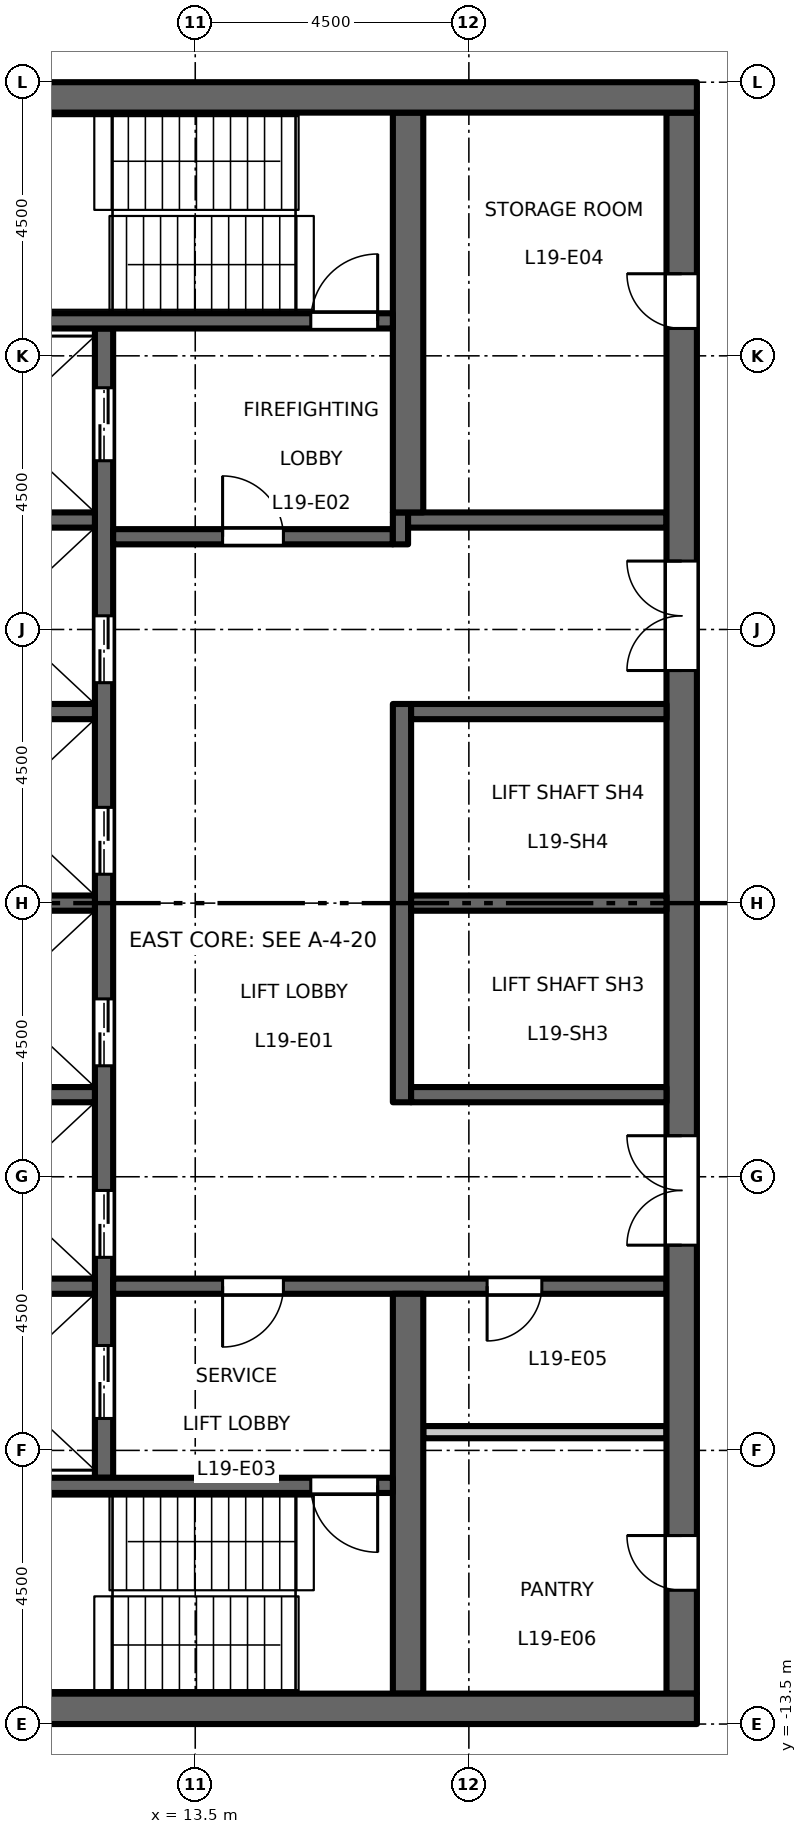
"""IFC4 building model, lengths in metres.
Left out: names, types, materials, properties, quantities, classifications, styles, units other than length and angle.
Written with IfcOpenShell. Run it as: python <this file> out.ifc"""

import sys

from ifc_helpers import new_model, si_unit, direction, frame, frame_2d, origin, place, context, subcontext, project, spatial, rectangle, extrude, element, fill, save


model = new_model("IFC4")
c1 = context("Model", 3, precision=1e-05, world=origin(), true_north=direction((0.0, 1.0)))
c2 = subcontext(c1, "Body", "Model", "MODEL_VIEW")
j1 = project(units=[si_unit("LENGTHUNIT", "METRE"), si_unit("PLANEANGLEUNIT", "RADIAN")], contexts=[c1])
p1 = place(None, origin())
s1 = spatial("IfcSite", under=j1, at=p1, CompositionType="ELEMENT")
p2 = place(p1, origin())
s2 = spatial("IfcBuilding", under=s1, at=p2, CompositionType="ELEMENT")
p3 = place(p2, frame((0.0, 0.0, 89.7)))
s3 = spatial("IfcBuildingStorey", under=s2, at=p3, CompositionType="ELEMENT", Elevation=89.7)
p4 = place(p3, frame((12.0, -9.45, 0.0), z_axis=(0.0, 0.0, 1.0), x_axis=(0.0, 1.0, 0.0)))
e1 = element("IfcWall", 1, at=p4, inside=s3, PredefinedType="SHEAR", context=c2, shape_type="SweptSolid", body=[
    extrude(rectangle(XDim=18.9, YDim=0.3, at=frame_2d((9.45, 0.0))), origin(), (0.0, 0.0, 1.0), 4.3),
])
p5 = place(p4, frame((3.625, 0.0, 0.0)))
e2 = element("IfcOpeningElement", 2, at=p5, cuts=e1, PredefinedType="OPENING", context=c2, shape_type="SweptSolid", body=[
    extrude(rectangle(XDim=1.1, YDim=2.1, at=frame_2d((0.55, 1.05))), frame((0.0, 0.16, 0.0), z_axis=(0.0, -1.0, 0.0), x_axis=(1.0, 0.0, 0.0)), (0.0, 0.0, 1.0), 0.32),
])
p6 = place(p4, frame((6.775, 0.0, 0.0)))
e3 = element("IfcOpeningElement", 3, at=p6, cuts=e1, PredefinedType="OPENING", context=c2, shape_type="SweptSolid", body=[
    extrude(rectangle(XDim=1.1, YDim=2.1, at=frame_2d((0.55, 1.05))), frame((0.0, 0.16, 0.0), z_axis=(0.0, -1.0, 0.0), x_axis=(1.0, 0.0, 0.0)), (0.0, 0.0, 1.0), 0.32),
])
p7 = place(p4, frame((9.925, 0.0, 0.0)))
e4 = element("IfcOpeningElement", 4, at=p7, cuts=e1, PredefinedType="OPENING", context=c2, shape_type="SweptSolid", body=[
    extrude(rectangle(XDim=1.1, YDim=2.1, at=frame_2d((0.55, 1.05))), frame((0.0, 0.16, 0.0), z_axis=(0.0, -1.0, 0.0), x_axis=(1.0, 0.0, 0.0)), (0.0, 0.0, 1.0), 0.32),
])
p8 = place(p4, frame((13.075, 0.0, 0.0)))
e5 = element("IfcOpeningElement", 5, at=p8, cuts=e1, PredefinedType="OPENING", context=c2, shape_type="SweptSolid", body=[
    extrude(rectangle(XDim=1.1, YDim=2.1, at=frame_2d((0.55, 1.05))), frame((0.0, 0.16, 0.0), z_axis=(0.0, -1.0, 0.0), x_axis=(1.0, 0.0, 0.0)), (0.0, 0.0, 1.0), 0.32),
])
p9 = place(p4, frame((16.725, 0.0, 0.0)))
e6 = element("IfcOpeningElement", 6, at=p9, cuts=e1, PredefinedType="OPENING", context=c2, shape_type="SweptSolid", body=[
    extrude(rectangle(XDim=1.2, YDim=2.1, at=frame_2d((0.6, 1.05))), frame((0.0, 0.16, 0.0), z_axis=(0.0, -1.0, 0.0), x_axis=(1.0, 0.0, 0.0)), (0.0, 0.0, 1.0), 0.32),
])
p10 = place(p4, frame((0.975, 0.0, 0.0)))
e7 = element("IfcOpeningElement", 7, at=p10, cuts=e1, PredefinedType="OPENING", context=c2, shape_type="SweptSolid", body=[
    extrude(rectangle(XDim=1.2, YDim=2.1, at=frame_2d((0.6, 1.05))), frame((0.0, 0.16, 0.0), z_axis=(0.0, -1.0, 0.0), x_axis=(1.0, 0.0, 0.0)), (0.0, 0.0, 1.0), 0.32),
])
p11 = place(p3, frame((12.15, 6.025, 0.0), z_axis=(0.0, 0.0, 1.0), x_axis=(1.0, 0.0, 0.0)))
e8 = element("IfcWall", 8, at=p11, inside=s3, PredefinedType="SHEAR", context=c2, shape_type="SweptSolid", body=[
    extrude(rectangle(XDim=4.6, YDim=0.25, at=frame_2d((2.3, 0.0))), origin(), (0.0, 0.0, 1.0), 4.3),
])
p12 = place(p11, frame((1.8, 0.0, 0.0)))
e9 = element("IfcOpeningElement", 9, at=p12, cuts=e8, PredefinedType="OPENING", context=c2, shape_type="SweptSolid", body=[
    extrude(rectangle(XDim=1.0, YDim=2.1, at=frame_2d((0.5, 1.05))), frame((0.0, 0.135, 0.0), z_axis=(0.0, -1.0, 0.0), x_axis=(1.0, 0.0, 0.0)), (0.0, 0.0, 1.0), 0.27),
])
p13 = place(p3, frame((16.875, 5.9, 0.0), z_axis=(0.0, 0.0, 1.0), x_axis=(0.0, 1.0, 0.0)))
e10 = element("IfcWall", 10, at=p13, inside=s3, PredefinedType="SHEAR", context=c2, shape_type="SweptSolid", body=[
    extrude(rectangle(XDim=0.525, YDim=0.25, at=frame_2d((0.263, 0.0))), origin(), (0.0, 0.0, 1.0), 4.3),
])
p14 = place(p3, frame((17.0, 6.3, 0.0), z_axis=(0.0, 0.0, 1.0), x_axis=(1.0, 0.0, 0.0)))
e11 = element("IfcWall", 11, at=p14, inside=s3, PredefinedType="SHEAR", context=c2, shape_type="SweptSolid", body=[
    extrude(rectangle(XDim=4.25, YDim=0.25, at=frame_2d((2.125, 0.0))), origin(), (0.0, 0.0, 1.0), 4.3),
])
p15 = place(p3, frame((12.15, -6.3, 0.0), z_axis=(0.0, 0.0, 1.0), x_axis=(1.0, 0.0, 0.0)))
e12 = element("IfcWall", 12, at=p15, inside=s3, PredefinedType="SHEAR", context=c2, shape_type="SweptSolid", body=[
    extrude(rectangle(XDim=9.1, YDim=0.25, at=frame_2d((4.55, 0.0))), origin(), (0.0, 0.0, 1.0), 4.3),
])
p16 = place(p15, frame((1.8, 0.0, 0.0)))
e13 = element("IfcOpeningElement", 13, at=p16, cuts=e12, PredefinedType="OPENING", context=c2, shape_type="SweptSolid", body=[
    extrude(rectangle(XDim=1.0, YDim=2.1, at=frame_2d((0.5, 1.05))), frame((0.0, 0.135, 0.0), z_axis=(0.0, -1.0, 0.0), x_axis=(1.0, 0.0, 0.0)), (0.0, 0.0, 1.0), 0.27),
])
p17 = place(p15, frame((6.15, 0.0, 0.0)))
e14 = element("IfcOpeningElement", 14, at=p17, cuts=e12, PredefinedType="OPENING", context=c2, shape_type="SweptSolid", body=[
    extrude(rectangle(XDim=0.9, YDim=2.1, at=frame_2d((0.45, 1.05))), frame((0.0, 0.135, 0.0), z_axis=(0.0, -1.0, 0.0), x_axis=(1.0, 0.0, 0.0)), (0.0, 0.0, 1.0), 0.27),
])
p18 = place(p3, frame((21.5, -13.0, 0.0), z_axis=(0.0, 0.0, 1.0), x_axis=(0.0, 1.0, 0.0)))
e15 = element("IfcWall", 15, at=p18, inside=s3, PredefinedType="SHEAR", context=c2, shape_type="SweptSolid", body=[
    extrude(rectangle(XDim=26.0, YDim=0.5, at=frame_2d((13.0, 0.0))), origin(), (0.0, 0.0, 1.0), 4.3),
])
p19 = place(p18, frame((16.825, 0.0, 0.0)))
e16 = element("IfcOpeningElement", 16, at=p19, cuts=e15, PredefinedType="OPENING", context=c2, shape_type="SweptSolid", body=[
    extrude(rectangle(XDim=1.8, YDim=2.1, at=frame_2d((0.9, 1.05))), frame((0.0, 0.26, 0.0), z_axis=(0.0, -1.0, 0.0), x_axis=(1.0, 0.0, 0.0)), (0.0, 0.0, 1.0), 0.52),
])
p20 = place(p18, frame((7.375, 0.0, 0.0)))
e17 = element("IfcOpeningElement", 17, at=p20, cuts=e15, PredefinedType="OPENING", context=c2, shape_type="SweptSolid", body=[
    extrude(rectangle(XDim=1.8, YDim=2.1, at=frame_2d((0.9, 1.05))), frame((0.0, 0.26, 0.0), z_axis=(0.0, -1.0, 0.0), x_axis=(1.0, 0.0, 0.0)), (0.0, 0.0, 1.0), 0.52),
])
p21 = place(p18, frame((22.45, 0.0, 0.0)))
e18 = element("IfcOpeningElement", 18, at=p21, cuts=e15, PredefinedType="OPENING", context=c2, shape_type="SweptSolid", body=[
    extrude(rectangle(XDim=0.9, YDim=2.1, at=frame_2d((0.45, 1.05))), frame((0.0, 0.26, 0.0), z_axis=(0.0, -1.0, 0.0), x_axis=(1.0, 0.0, 0.0)), (0.0, 0.0, 1.0), 0.52),
])
p22 = place(p18, frame((1.7, 0.0, 0.0)))
e19 = element("IfcOpeningElement", 19, at=p22, cuts=e15, PredefinedType="OPENING", context=c2, shape_type="SweptSolid", body=[
    extrude(rectangle(XDim=0.9, YDim=2.1, at=frame_2d((0.45, 1.05))), frame((0.0, 0.26, 0.0), z_axis=(0.0, -1.0, 0.0), x_axis=(1.0, 0.0, 0.0)), (0.0, 0.0, 1.0), 0.52),
])
p23 = place(p3, frame((17.25, -8.7, 0.0), z_axis=(0.0, 0.0, 1.0), x_axis=(1.0, 0.0, 0.0)))
e20 = element("IfcWall", 20, at=p23, inside=s3, PredefinedType="PARTITIONING", context=c2, shape_type="SweptSolid", body=[
    extrude(rectangle(XDim=4.0, YDim=0.2, at=frame_2d((2.0, 0.0))), origin(), (0.0, 0.0, 1.0), 4.3),
])
p24 = place(p3, frame((16.9, -3.275, 0.0), z_axis=(0.0, 0.0, 1.0), x_axis=(0.0, 1.0, 0.0)))
e21 = element("IfcWall", 21, at=p24, inside=s3, PredefinedType="SHEAR", context=c2, shape_type="SweptSolid", body=[
    extrude(rectangle(XDim=6.55, YDim=0.3, at=frame_2d((3.275, 0.0))), origin(), (0.0, 0.0, 1.0), 4.3),
])
for number, where, z_axis, x_axis in (
    (22, (17.05, 0.0, 0.0), (0.0, 0.0, 1.0), (1.0, 0.0, 0.0)),
    (23, (17.05, 3.15, 0.0), (0.0, 0.0, 1.0), (1.0, 0.0, 0.0)),
    (24, (17.05, -3.15, 0.0), (0.0, 0.0, 1.0), (1.0, 0.0, 0.0)),
):
    element("IfcWall", number, at=place(p3, frame(where, z_axis=z_axis, x_axis=x_axis)), inside=s3, PredefinedType="SHEAR", context=c2, shape_type="SweptSolid", body=[
        extrude(rectangle(XDim=4.2, YDim=0.25, at=frame_2d((2.1, 0.0))), origin(), (0.0, 0.0, 1.0), 4.3),
    ])
for number, where, z_axis, x_axis in (
    (25, (17.0, 6.425, 0.0), (0.0, 0.0, 1.0), (0.0, 1.0, 0.0)),
    (26, (17.0, -13.0, 0.0), (0.0, 0.0, 1.0), (0.0, 1.0, 0.0)),
):
    element("IfcWall", number, at=place(p3, frame(where, z_axis=z_axis, x_axis=x_axis)), inside=s3, PredefinedType="SHEAR", context=c2, shape_type="SweptSolid", body=[
        extrude(rectangle(XDim=6.575, YDim=0.5, at=frame_2d((3.288, 0.0))), origin(), (0.0, 0.0, 1.0), 4.3),
    ])
for number, where, z_axis, x_axis in (
    (27, (8.75, 0.0, 0.0), (0.0, 0.0, 1.0), (1.0, 0.0, 0.0)),
    (28, (8.75, 3.15, 0.0), (0.0, 0.0, 1.0), (1.0, 0.0, 0.0)),
    (29, (8.75, 6.3, 0.0), (0.0, 0.0, 1.0), (1.0, 0.0, 0.0)),
    (30, (8.75, -3.15, 0.0), (0.0, 0.0, 1.0), (1.0, 0.0, 0.0)),
    (31, (8.75, -6.3, 0.0), (0.0, 0.0, 1.0), (1.0, 0.0, 0.0)),
):
    element("IfcWall", number, at=place(p3, frame(where, z_axis=z_axis, x_axis=x_axis)), inside=s3, PredefinedType="SHEAR", context=c2, shape_type="SweptSolid", body=[
        extrude(rectangle(XDim=3.1, YDim=0.25, at=frame_2d((1.55, 0.0))), origin(), (0.0, 0.0, 1.0), 4.3),
    ])
p25 = place(p3, frame((8.75, 9.575, 0.0), z_axis=(0.0, 0.0, 1.0), x_axis=(1.0, 0.0, 0.0)))
e32 = element("IfcWall", 32, at=p25, inside=s3, PredefinedType="SHEAR", context=c2, shape_type="SweptSolid", body=[
    extrude(rectangle(XDim=8.0, YDim=0.25, at=frame_2d((4.0, 0.0))), origin(), (0.0, 0.0, 1.0), 4.3),
])
p26 = place(p25, frame((6.65, 0.0, 0.0)))
e33 = element("IfcOpeningElement", 33, at=p26, cuts=e32, PredefinedType="OPENING", context=c2, shape_type="SweptSolid", body=[
    extrude(rectangle(XDim=1.1, YDim=2.1, at=frame_2d((0.55, 1.05))), frame((0.0, 0.135, 0.0), z_axis=(0.0, -1.0, 0.0), x_axis=(1.0, 0.0, 0.0)), (0.0, 0.0, 1.0), 0.27),
])
p27 = place(p3, frame((8.75, -9.575, 0.0), z_axis=(0.0, 0.0, 1.0), x_axis=(1.0, 0.0, 0.0)))
e34 = element("IfcWall", 34, at=p27, inside=s3, PredefinedType="SHEAR", context=c2, shape_type="SweptSolid", body=[
    extrude(rectangle(XDim=8.0, YDim=0.25, at=frame_2d((4.0, 0.0))), origin(), (0.0, 0.0, 1.0), 4.3),
])
p28 = place(p27, frame((6.65, 0.0, 0.0)))
e35 = element("IfcOpeningElement", 35, at=p28, cuts=e34, PredefinedType="OPENING", context=c2, shape_type="SweptSolid", body=[
    extrude(rectangle(XDim=1.1, YDim=2.1, at=frame_2d((0.55, 1.05))), frame((0.0, 0.135, 0.0), z_axis=(0.0, -1.0, 0.0), x_axis=(1.0, 0.0, 0.0)), (0.0, 0.0, 1.0), 0.27),
])
for number, where, z_axis, x_axis in (
    (36, (8.25, 13.25, 0.0), (0.0, 0.0, 1.0), (1.0, 0.0, 0.0)),
    (37, (8.25, -13.25, 0.0), (0.0, 0.0, 1.0), (1.0, 0.0, 0.0)),
):
    element("IfcWall", number, at=place(p3, frame(where, z_axis=z_axis, x_axis=x_axis)), inside=s3, PredefinedType="SHEAR", context=c2, shape_type="SweptSolid", body=[
        extrude(rectangle(XDim=13.5, YDim=0.5, at=frame_2d((6.75, 0.0))), origin(), (0.0, 0.0, 1.0), 4.3),
    ])
p29 = place(p12, origin())
e38 = element("IfcDoor", 38, at=p29, inside=s3, OperationType="SINGLE_SWING_RIGHT", PredefinedType="DOOR", context=c2, shape_type="SweptSolid", body=[
    extrude(rectangle(XDim=1.0, YDim=2.1, at=frame_2d((0.5, 1.05))), frame((0.0, 0.025, 0.0), z_axis=(0.0, -1.0, 0.0), x_axis=(1.0, 0.0, 0.0)), (0.0, 0.0, 1.0), 0.05),
])
fill(e9, e38)
p30 = place(p16, origin())
e39 = element("IfcDoor", 39, at=p30, inside=s3, OperationType="SINGLE_SWING_LEFT", PredefinedType="DOOR", context=c2, shape_type="SweptSolid", body=[
    extrude(rectangle(XDim=1.0, YDim=2.1, at=frame_2d((0.5, 1.05))), frame((0.0, 0.025, 0.0), z_axis=(0.0, -1.0, 0.0), x_axis=(1.0, 0.0, 0.0)), (0.0, 0.0, 1.0), 0.05),
])
fill(e13, e39)
p31 = place(p26, origin())
e40 = element("IfcDoor", 40, at=p31, inside=s3, OperationType="SINGLE_SWING_LEFT", PredefinedType="DOOR", context=c2, shape_type="SweptSolid", body=[
    extrude(rectangle(XDim=1.1, YDim=2.1, at=frame_2d((0.55, 1.05))), frame((0.0, 0.025, 0.0), z_axis=(0.0, -1.0, 0.0), x_axis=(1.0, 0.0, 0.0)), (0.0, 0.0, 1.0), 0.05),
])
fill(e33, e40)
p32 = place(p28, origin())
e41 = element("IfcDoor", 41, at=p32, inside=s3, OperationType="SINGLE_SWING_RIGHT", PredefinedType="DOOR", context=c2, shape_type="SweptSolid", body=[
    extrude(rectangle(XDim=1.1, YDim=2.1, at=frame_2d((0.55, 1.05))), frame((0.0, 0.025, 0.0), z_axis=(0.0, -1.0, 0.0), x_axis=(1.0, 0.0, 0.0)), (0.0, 0.0, 1.0), 0.05),
])
fill(e35, e41)
p33 = place(p19, origin())
e42 = element("IfcDoor", 42, at=p33, inside=s3, OperationType="DOUBLE_DOOR_DOUBLE_SWING", PredefinedType="DOOR", context=c2, shape_type="SweptSolid", body=[
    extrude(rectangle(XDim=1.8, YDim=2.1, at=frame_2d((0.9, 1.05))), frame((0.0, 0.025, 0.0), z_axis=(0.0, -1.0, 0.0), x_axis=(1.0, 0.0, 0.0)), (0.0, 0.0, 1.0), 0.05),
])
fill(e16, e42)
p34 = place(p20, origin())
e43 = element("IfcDoor", 43, at=p34, inside=s3, OperationType="DOUBLE_DOOR_DOUBLE_SWING", PredefinedType="DOOR", context=c2, shape_type="SweptSolid", body=[
    extrude(rectangle(XDim=1.8, YDim=2.1, at=frame_2d((0.9, 1.05))), frame((0.0, 0.025, 0.0), z_axis=(0.0, -1.0, 0.0), x_axis=(1.0, 0.0, 0.0)), (0.0, 0.0, 1.0), 0.05),
])
fill(e17, e43)
p35 = place(p5, origin())
e44 = element("IfcDoor", 44, at=p35, inside=s3, OperationType="DOUBLE_DOOR_SLIDING", PredefinedType="DOOR", context=c2, shape_type="SweptSolid", body=[
    extrude(rectangle(XDim=1.1, YDim=2.1, at=frame_2d((0.55, 1.05))), frame((0.0, 0.025, 0.0), z_axis=(0.0, -1.0, 0.0), x_axis=(1.0, 0.0, 0.0)), (0.0, 0.0, 1.0), 0.05),
])
fill(e2, e44)
p36 = place(p6, origin())
e45 = element("IfcDoor", 45, at=p36, inside=s3, OperationType="DOUBLE_DOOR_SLIDING", PredefinedType="DOOR", context=c2, shape_type="SweptSolid", body=[
    extrude(rectangle(XDim=1.1, YDim=2.1, at=frame_2d((0.55, 1.05))), frame((0.0, 0.025, 0.0), z_axis=(0.0, -1.0, 0.0), x_axis=(1.0, 0.0, 0.0)), (0.0, 0.0, 1.0), 0.05),
])
fill(e3, e45)
p37 = place(p7, origin())
e46 = element("IfcDoor", 46, at=p37, inside=s3, OperationType="DOUBLE_DOOR_SLIDING", PredefinedType="DOOR", context=c2, shape_type="SweptSolid", body=[
    extrude(rectangle(XDim=1.1, YDim=2.1, at=frame_2d((0.55, 1.05))), frame((0.0, 0.025, 0.0), z_axis=(0.0, -1.0, 0.0), x_axis=(1.0, 0.0, 0.0)), (0.0, 0.0, 1.0), 0.05),
])
fill(e4, e46)
p38 = place(p8, origin())
e47 = element("IfcDoor", 47, at=p38, inside=s3, OperationType="DOUBLE_DOOR_SLIDING", PredefinedType="DOOR", context=c2, shape_type="SweptSolid", body=[
    extrude(rectangle(XDim=1.1, YDim=2.1, at=frame_2d((0.55, 1.05))), frame((0.0, 0.025, 0.0), z_axis=(0.0, -1.0, 0.0), x_axis=(1.0, 0.0, 0.0)), (0.0, 0.0, 1.0), 0.05),
])
fill(e5, e47)
p39 = place(p9, origin())
e48 = element("IfcDoor", 48, at=p39, inside=s3, OperationType="DOUBLE_DOOR_SLIDING", PredefinedType="DOOR", context=c2, shape_type="SweptSolid", body=[
    extrude(rectangle(XDim=1.2, YDim=2.1, at=frame_2d((0.6, 1.05))), frame((0.0, 0.025, 0.0), z_axis=(0.0, -1.0, 0.0), x_axis=(1.0, 0.0, 0.0)), (0.0, 0.0, 1.0), 0.05),
])
fill(e6, e48)
p40 = place(p10, origin())
e49 = element("IfcDoor", 49, at=p40, inside=s3, OperationType="DOUBLE_DOOR_SLIDING", PredefinedType="DOOR", context=c2, shape_type="SweptSolid", body=[
    extrude(rectangle(XDim=1.2, YDim=2.1, at=frame_2d((0.6, 1.05))), frame((0.0, 0.025, 0.0), z_axis=(0.0, -1.0, 0.0), x_axis=(1.0, 0.0, 0.0)), (0.0, 0.0, 1.0), 0.05),
])
fill(e7, e49)
p41 = place(p21, origin())
e50 = element("IfcDoor", 50, at=p41, inside=s3, OperationType="SINGLE_SWING_LEFT", PredefinedType="DOOR", context=c2, shape_type="SweptSolid", body=[
    extrude(rectangle(XDim=0.9, YDim=2.1, at=frame_2d((0.45, 1.05))), frame((0.0, 0.025, 0.0), z_axis=(0.0, -1.0, 0.0), x_axis=(1.0, 0.0, 0.0)), (0.0, 0.0, 1.0), 0.05),
])
fill(e18, e50)
p42 = place(p17, origin())
e51 = element("IfcDoor", 51, at=p42, inside=s3, OperationType="SINGLE_SWING_LEFT", PredefinedType="DOOR", context=c2, shape_type="SweptSolid", body=[
    extrude(rectangle(XDim=0.9, YDim=2.1, at=frame_2d((0.45, 1.05))), frame((0.0, 0.025, 0.0), z_axis=(0.0, -1.0, 0.0), x_axis=(1.0, 0.0, 0.0)), (0.0, 0.0, 1.0), 0.05),
])
fill(e14, e51)
p43 = place(p22, origin())
e52 = element("IfcDoor", 52, at=p43, inside=s3, OperationType="SINGLE_SWING_LEFT", PredefinedType="DOOR", context=c2, shape_type="SweptSolid", body=[
    extrude(rectangle(XDim=0.9, YDim=2.1, at=frame_2d((0.45, 1.05))), frame((0.0, 0.025, 0.0), z_axis=(0.0, -1.0, 0.0), x_axis=(1.0, 0.0, 0.0)), (0.0, 0.0, 1.0), 0.05),
])
fill(e19, e52)
save(model, sys.argv[1])
